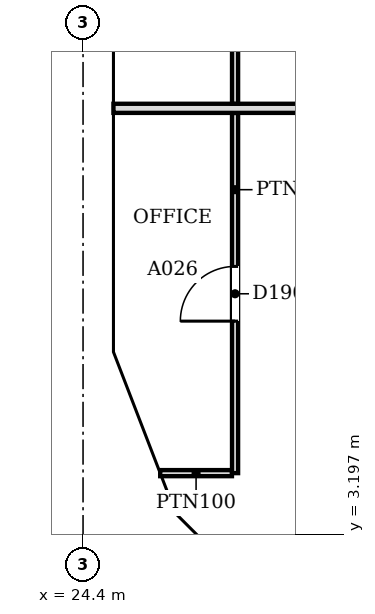
"""IFC4 building model, lengths in metres.
Left out: names, types, materials, properties, quantities, classifications, styles, units other than length and angle.
Written with IfcOpenShell. Run it as: python <this file> out.ifc"""

import sys

from ifc_helpers import new_model, si_unit, direction, frame, frame_2d, origin, place, context, subcontext, project, spatial, polyline, rectangle, outline, extrude, faceted_brep, source, transform, mapped, element, fill, save


model = new_model("IFC4")
c1 = context("Model", 3, precision=1e-05, world=origin(), true_north=direction((0.0, 1.0)))
c2 = subcontext(c1, "Body", "Model", "MODEL_VIEW")
j1 = project(units=[si_unit("LENGTHUNIT", "METRE"), si_unit("PLANEANGLEUNIT", "RADIAN")], contexts=[c1])
p1 = place(None, origin())
s1 = spatial("IfcSite", under=j1, at=p1, CompositionType="ELEMENT")
p2 = place(p1, origin())
s2 = spatial("IfcBuilding", under=s1, at=p2, CompositionType="ELEMENT")
p3 = place(p2, frame((0.0, 0.0, 143.0)))
s3 = spatial("IfcBuildingStorey", under=s2, at=p3, CompositionType="ELEMENT", Elevation=143.0)
m1 = source(origin(), c2, "Body", "Brep", [
    faceted_brep([(3.096, -0.25, 0.0), (6.1, -0.25, 3.8), (3.096, -0.25, 7.6), (0.047, -0.25, 3.857), (0.047, -0.25, 3.743), (0.0, 0.25, 3.8), (3.096, 0.25, 7.6), (6.053, 0.25, 3.859), (6.053, 0.25, 3.741), (3.096, 0.25, 0.0), (6.1, -0.0, 3.8), (0.0, 0.0, 3.8)], [[[0, 1, 2, 3, 4]], [[5, 6, 7, 8, 9]], [[9, 8, 10, 1, 0]], [[7, 6, 2, 1, 10]], [[6, 5, 11, 3, 2]], [[5, 9, 0, 4, 11]], [[11, 4, 3]], [[10, 8, 7]]]),
])
p4 = place(p3, frame((24.65, 12.247, -3.8), z_axis=(0.0, 0.0, 1.0), x_axis=(0.0, -1.0, 0.0)))
e1 = element("IfcWall", 1, at=p4, inside=s3, PredefinedType="SOLIDWALL", context=c2, shape_type="MappedRepresentation", body=[
    mapped(m1, transform((0.0, 0.0, 0.0), scale=1.0)),
])
m2 = source(origin(), c2, "Body", "SweptSolid", [
    extrude(outline(polyline([(3.094, 0.399), (5.781, 3.8), (3.094, 7.201), (0.323, 3.8), (3.094, 0.399)])), frame((0.0, 0.26, 0.0), z_axis=(0.0, -1.0, 0.0), x_axis=(1.0, 0.0, 0.0)), (0.0, 0.0, 1.0), 0.52),
])
p5 = place(p4, origin())
e2 = element("IfcOpeningElement", 2, at=p5, cuts=e1, PredefinedType="OPENING", context=c2, shape_type="MappedRepresentation", body=[
    mapped(m2, transform((0.0, 0.0, 0.0), scale=1.0)),
])
m3 = source(origin(), c2, "Body", "Brep", [
    faceted_brep([(2.95, -0.25, 0.0), (3.003, -0.25, 0.068), (3.003, -0.25, 7.532), (2.95, -0.25, 7.6), (0.0, -0.25, 3.8), (0.047, 0.25, 3.86), (2.898, 0.25, 7.532), (2.898, 0.25, 0.068), (0.047, 0.25, 3.74), (2.95, 0.0, 0.0), (2.95, 0.0, 7.6), (0.0, 0.0, 3.8)], [[[0, 1, 2, 3, 4]], [[5, 6, 7, 8]], [[1, 0, 9]], [[10, 3, 2]], [[6, 5, 11, 4, 3, 10]], [[8, 7, 9, 0, 4, 11]], [[8, 11, 5]], [[1, 9, 7, 6, 10, 2]]]),
])
p6 = place(p3, frame((24.65, 6.146, -3.8), z_axis=(0.0, 0.0, 1.0), x_axis=(0.359953949349, -0.932970071518, 0.0)))
e3 = element("IfcWall", 3, at=p6, inside=s3, PredefinedType="SOLIDWALL", context=c2, shape_type="MappedRepresentation", body=[
    mapped(m3, transform((0.0, 0.0, 0.0), scale=1.0)),
])
m4 = source(origin(), c2, "Body", "SweptSolid", [
    extrude(outline(polyline([(2.75, 6.935), (0.316, 3.8), (2.75, 0.665), (2.75, 6.935)])), frame((0.0, 0.26, 0.0), z_axis=(0.0, -1.0, 0.0), x_axis=(1.0, 0.0, 0.0)), (0.0, 0.0, 1.0), 0.52),
])
p7 = place(p6, origin())
e4 = element("IfcOpeningElement", 4, at=p7, cuts=e3, PredefinedType="OPENING", context=c2, shape_type="MappedRepresentation", body=[
    mapped(m4, transform((0.0, 0.0, 0.0), scale=1.0)),
])
m5 = source(origin(), c2, "Body", "Brep", [
    faceted_brep([(0.053, -0.25, 0.0), (2.997, -0.25, 3.8), (0.053, -0.25, 7.6), (0.0, -0.25, 7.532), (0.0, -0.25, 0.068), (0.106, 0.25, 7.532), (2.944, 0.25, 3.868), (2.944, 0.25, 3.732), (0.106, 0.25, 0.068), (2.997, 0.0, 3.8), (0.053, 0.0, 0.0), (0.053, 0.0, 7.6)], [[[0, 1, 2, 3, 4]], [[5, 6, 7, 8]], [[8, 7, 9, 1, 0, 10]], [[6, 5, 11, 2, 1, 9]], [[3, 2, 11]], [[10, 0, 4]], [[8, 10, 4, 3, 11, 5]], [[9, 7, 6]]]),
])
p8 = place(p3, frame((25.675, 3.431, -3.8), z_axis=(0.0, 0.0, 1.0), x_axis=(0.707106781187, -0.707106781187, 0.0)))
e5 = element("IfcWall", 5, at=p8, inside=s3, PredefinedType="SOLIDWALL", context=c2, shape_type="MappedRepresentation", body=[
    mapped(m5, transform((0.0, 0.0, 0.0), scale=1.0)),
])
m6 = source(origin(), c2, "Body", "SweptSolid", [
    extrude(outline(polyline([(0.253, 0.666), (2.681, 3.8), (0.253, 6.934), (0.253, 0.666)])), frame((0.0, 0.26, 0.0), z_axis=(0.0, -1.0, 0.0), x_axis=(1.0, 0.0, 0.0)), (0.0, 0.0, 1.0), 0.52),
])
p9 = place(p8, origin())
e6 = element("IfcOpeningElement", 6, at=p9, cuts=e5, PredefinedType="OPENING", context=c2, shape_type="MappedRepresentation", body=[
    mapped(m6, transform((0.0, 0.0, 0.0), scale=1.0)),
])
p10 = place(p2, frame((0.0, 0.0, 146.8)))
s4 = spatial("IfcBuildingStorey", under=s2, at=p10, CompositionType="ELEMENT", Elevation=146.8)
m7 = source(origin(), c2, "Body", "Brep", [
    faceted_brep([(0.093, -0.25, 0.057), (3.143, -0.25, 3.8), (0.093, -0.25, 7.543), (0.0, 0.25, 7.544), (0.047, 0.25, 7.6), (3.143, 0.25, 3.8), (0.047, 0.25, 0.0), (0.0, 0.25, 0.056), (0.047, 0.0, 0.0), (0.047, 0.0, 7.6)], [[[0, 1, 2]], [[3, 4, 5, 6, 7]], [[6, 5, 1, 0, 8]], [[5, 4, 9, 2, 1]], [[4, 3, 9]], [[7, 6, 8]], [[7, 8, 0, 2, 9, 3]]]),
])
p11 = place(p10, frame((24.65, 12.293, -3.8), z_axis=(0.0, 0.0, 1.0), x_axis=(0.0, -1.0, 0.0)))
e7 = element("IfcWall", 7, at=p11, inside=s4, PredefinedType="SOLIDWALL", context=c2, shape_type="MappedRepresentation", body=[
    mapped(m7, transform((0.0, 0.0, 0.0), scale=1.0)),
])
m8 = source(origin(), c2, "Body", "SweptSolid", [
    extrude(outline(polyline([(0.247, 0.641), (2.821, 3.8), (0.247, 6.959), (0.247, 0.641)])), frame((0.0, 0.26, 0.0), z_axis=(0.0, -1.0, 0.0), x_axis=(1.0, 0.0, 0.0)), (0.0, 0.0, 1.0), 0.52),
])
p12 = place(p11, origin())
e8 = element("IfcOpeningElement", 8, at=p12, cuts=e7, PredefinedType="OPENING", context=c2, shape_type="MappedRepresentation", body=[
    mapped(m8, transform((0.0, 0.0, 0.0), scale=1.0)),
])
m9 = source(origin(), c2, "Body", "Brep", [
    faceted_brep([(3.003, -0.25, 0.0), (3.05, -0.25, 0.06), (3.05, -0.25, 7.54), (3.003, -0.25, 7.6), (0.0, -0.25, 3.8), (0.0, 0.25, 3.8), (2.957, 0.25, 7.541), (2.957, 0.25, 0.059), (3.003, 0.0, 0.0), (3.003, 0.0, 7.6)], [[[0, 1, 2, 3, 4]], [[5, 6, 7]], [[1, 0, 8]], [[9, 3, 2]], [[6, 5, 4, 3, 9]], [[5, 7, 8, 0, 4]], [[1, 8, 7, 6, 9, 2]]]),
])
p13 = place(p10, frame((24.65, 9.15, -3.8), z_axis=(0.0, 0.0, 1.0), x_axis=(0.0, -1.0, 0.0)))
e9 = element("IfcWall", 9, at=p13, inside=s4, PredefinedType="SOLIDWALL", context=c2, shape_type="MappedRepresentation", body=[
    mapped(m9, transform((0.0, 0.0, 0.0), scale=1.0)),
])
m10 = source(origin(), c2, "Body", "SweptSolid", [
    extrude(outline(polyline([(2.803, 6.944), (0.319, 3.8), (2.803, 0.656), (2.803, 6.944)])), frame((0.0, 0.26, 0.0), z_axis=(0.0, -1.0, 0.0), x_axis=(1.0, 0.0, 0.0)), (0.0, 0.0, 1.0), 0.52),
])
p14 = place(p13, origin())
e10 = element("IfcOpeningElement", 10, at=p14, cuts=e9, PredefinedType="OPENING", context=c2, shape_type="MappedRepresentation", body=[
    mapped(m10, transform((0.0, 0.0, 0.0), scale=1.0)),
])
m11 = source(origin(), c2, "Body", "Brep", [
    faceted_brep([(0.047, -0.25, 0.0), (2.997, -0.25, 3.8), (0.047, -0.25, 7.6), (0.0, -0.25, 7.541), (0.0, -0.25, 0.059), (0.093, 0.25, 7.54), (2.944, 0.25, 3.868), (2.944, 0.25, 3.732), (0.093, 0.25, 0.06), (2.997, 0.0, 3.8), (0.047, 0.0, 0.0), (0.047, 0.0, 7.6)], [[[0, 1, 2, 3, 4]], [[5, 6, 7, 8]], [[8, 7, 9, 1, 0, 10]], [[6, 5, 11, 2, 1, 9]], [[3, 2, 11]], [[10, 0, 4]], [[8, 10, 4, 3, 11, 5]], [[9, 7, 6]]]),
])
p15 = place(p10, frame((24.633, 6.19, -3.8), z_axis=(0.0, 0.0, 1.0), x_axis=(0.359901446078, -0.932990326376, 0.0)))
e11 = element("IfcWall", 11, at=p15, inside=s4, PredefinedType="SOLIDWALL", context=c2, shape_type="MappedRepresentation", body=[
    mapped(m11, transform((0.0, 0.0, 0.0), scale=1.0)),
])
m12 = source(origin(), c2, "Body", "SweptSolid", [
    extrude(outline(polyline([(0.247, 0.665), (2.681, 3.8), (0.247, 6.935), (0.247, 0.665)])), frame((0.0, 0.26, 0.0), z_axis=(0.0, -1.0, 0.0), x_axis=(1.0, 0.0, 0.0)), (0.0, 0.0, 1.0), 0.52),
])
p16 = place(p15, origin())
e12 = element("IfcOpeningElement", 12, at=p16, cuts=e11, PredefinedType="OPENING", context=c2, shape_type="MappedRepresentation", body=[
    mapped(m12, transform((0.0, 0.0, 0.0), scale=1.0)),
])
m13 = source(origin(), c2, "Body", "Brep", [
    faceted_brep([(2.944, -0.25, 0.0), (2.997, -0.25, 0.068), (2.997, -0.25, 7.532), (2.944, -0.25, 7.6), (0.0, -0.25, 3.8), (0.053, 0.25, 3.868), (2.891, 0.25, 7.532), (2.891, 0.25, 0.068), (0.053, 0.25, 3.732), (2.944, 0.0, 0.0), (2.944, 0.0, 7.6), (0.0, 0.0, 3.8)], [[[0, 1, 2, 3, 4]], [[5, 6, 7, 8]], [[1, 0, 9]], [[10, 3, 2]], [[6, 5, 11, 4, 3, 10]], [[8, 7, 9, 0, 4, 11]], [[8, 11, 5]], [[1, 9, 7, 6, 10, 2]]]),
])
p17 = place(p10, frame((25.712, 3.394, -3.8), z_axis=(0.0, 0.0, 1.0), x_axis=(0.707066050402, -0.707147509625, 0.0)))
e13 = element("IfcWall", 13, at=p17, inside=s4, PredefinedType="SOLIDWALL", context=c2, shape_type="MappedRepresentation", body=[
    mapped(m13, transform((0.0, 0.0, 0.0), scale=1.0)),
])
m14 = source(origin(), c2, "Body", "SweptSolid", [
    extrude(outline(polyline([(2.744, 6.934), (0.316, 3.8), (2.744, 0.666), (2.744, 6.934)])), frame((0.0, 0.26, 0.0), z_axis=(0.0, -1.0, 0.0), x_axis=(1.0, 0.0, 0.0)), (0.0, 0.0, 1.0), 0.52),
])
p18 = place(p17, origin())
e14 = element("IfcOpeningElement", 14, at=p18, cuts=e13, PredefinedType="OPENING", context=c2, shape_type="MappedRepresentation", body=[
    mapped(m14, transform((0.0, 0.0, 0.0), scale=1.0)),
])
p19 = place(p3, frame((25.669, 4.2, 0.0), z_axis=(0.0, 0.0, 1.0), x_axis=(1.0, 0.0, 0.0)))
e15 = element("IfcWall", 15, at=p19, inside=s3, PredefinedType="PARTITIONING", context=c2, shape_type="SweptSolid", body=[
    extrude(rectangle(XDim=1.18, YDim=0.1, at=frame_2d((0.59, 0.0))), origin(), (0.0, 0.0, 1.0), 3.067),
])
p20 = place(p3, frame((26.9, 4.2, 0.0), z_axis=(0.0, 0.0, 1.0), x_axis=(0.0, 1.0, 0.0)))
e16 = element("IfcWall", 16, at=p20, inside=s3, PredefinedType="PARTITIONING", context=c2, shape_type="SweptSolid", body=[
    extrude(rectangle(XDim=5.924, YDim=0.1, at=frame_2d((2.962, 0.0))), origin(), (0.0, 0.0, 1.0), 3.067),
])
m15 = source(origin(), c2, "Body", "SweptSolid", [
    extrude(rectangle(XDim=0.9, YDim=2.1, at=frame_2d((0.45, 1.05))), frame((0.0, 0.06, 0.0), z_axis=(0.0, -1.0, 0.0), x_axis=(1.0, 0.0, 0.0)), (0.0, 0.0, 1.0), 0.12),
])
p21 = place(p20, frame((2.5, 0.0, 0.0)))
e17 = element("IfcOpeningElement", 17, at=p21, cuts=e16, PredefinedType="OPENING", context=c2, shape_type="MappedRepresentation", body=[
    mapped(m15, transform((0.0, 0.0, 0.0), scale=1.0)),
])
p22 = place(p3, frame((24.9, 10.2, 0.0), z_axis=(0.0, 0.0, 1.0), x_axis=(1.0, 0.0, 0.0)))
e18 = element("IfcWall", 18, at=p22, inside=s3, PredefinedType="PARTITIONING", context=c2, shape_type="SweptSolid", body=[
    extrude(rectangle(XDim=15.9, YDim=0.15, at=frame_2d((7.95, 0.0))), origin(), (0.0, 0.0, 1.0), 3.067),
])
p23 = place(p3, frame((26.9, 10.276, 0.0), z_axis=(0.0, 0.0, 1.0), x_axis=(0.0, 1.0, 0.0)))
e19 = element("IfcWall", 19, at=p23, inside=s3, PredefinedType="PARTITIONING", context=c2, shape_type="SweptSolid", body=[
    extrude(rectangle(XDim=8.448, YDim=0.1, at=frame_2d((4.224, 0.0))), origin(), (0.0, 0.0, 1.0), 3.067),
])
p24 = place(p23, frame((6.026, 0.0, 0.0)))
e20 = element("IfcOpeningElement", 20, at=p24, cuts=e19, PredefinedType="OPENING", context=c2, shape_type="MappedRepresentation", body=[
    mapped(m15, transform((0.0, 0.0, 0.0), scale=1.0)),
])
p25 = place(p23, frame((1.8, 0.0, 0.0)))
e21 = element("IfcOpeningElement", 21, at=p25, cuts=e19, PredefinedType="OPENING", context=c2, shape_type="MappedRepresentation", body=[
    mapped(m15, transform((0.0, 0.0, 0.0), scale=1.0)),
])
m16 = source(origin(), c2, "Body", "SweptSolid", [
    extrude(rectangle(XDim=0.9, YDim=2.1, at=frame_2d((0.45, 1.05))), frame((0.0, 0.025, 0.0), z_axis=(0.0, -1.0, 0.0), x_axis=(1.0, 0.0, 0.0)), (0.0, 0.0, 1.0), 0.05),
])
p26 = place(p21, origin())
e22 = element("IfcDoor", 22, at=p26, inside=s3, OperationType="SINGLE_SWING_LEFT", PredefinedType="DOOR", context=c2, shape_type="MappedRepresentation", body=[
    mapped(m16, transform((0.0, 0.0, 0.0), scale=1.0)),
])
fill(e17, e22)
save(model, sys.argv[1])
